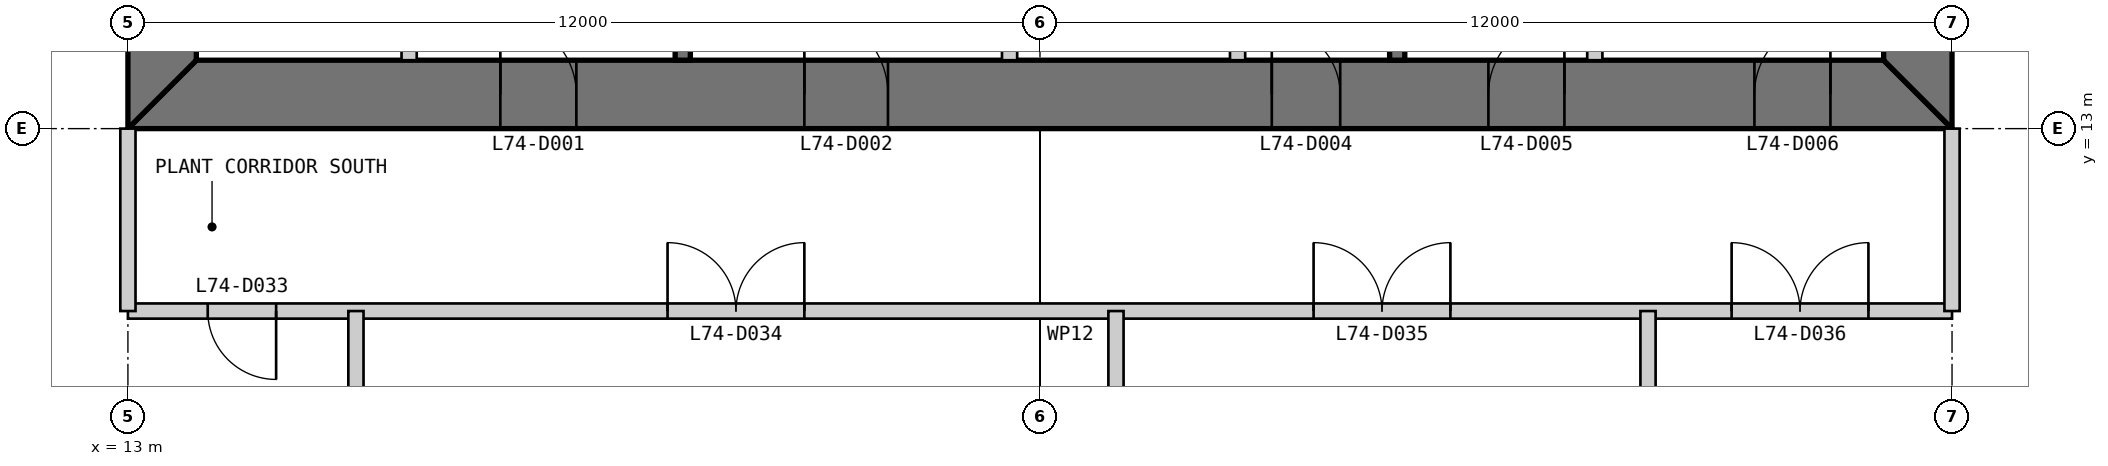
"""IFC4 building model, lengths in metres.
Left out: names, types, materials, properties, quantities, classifications, styles, units other than length and angle.
Written with IfcOpenShell. Run it as: python <this file> out.ifc"""

import sys

from ifc_helpers import new_model, si_unit, direction, frame, frame_2d, origin, place, context, subcontext, project, spatial, polyline, rectangle, outline, extrude, element, fill, save


model = new_model("IFC4")
c1 = context("Model", 3, precision=1e-05, world=origin(), true_north=direction((0.0, 1.0)))
c2 = subcontext(c1, "Body", "Model", "MODEL_VIEW")
j1 = project(units=[si_unit("LENGTHUNIT", "METRE"), si_unit("PLANEANGLEUNIT", "RADIAN")], contexts=[c1])
p1 = place(None, origin())
s1 = spatial("IfcSite", under=j1, at=p1, CompositionType="ELEMENT")
p2 = place(p1, origin())
s2 = spatial("IfcBuilding", under=s1, at=p2, CompositionType="ELEMENT")
p3 = place(p2, frame((0.0, 0.0, 307.8)))
s3 = spatial("IfcBuildingStorey", under=s2, at=p3, CompositionType="ELEMENT", Elevation=307.8)
p4 = place(p3, frame((13.0, 13.45, 0.0), z_axis=(0.0, 0.0, 1.0), x_axis=(1.0, 0.0, 0.0)))
e1 = element("IfcWall", 1, at=p4, inside=s3, PredefinedType="SHEAR", context=c2, shape_type="SweptSolid", body=[
    extrude(outline(polyline([(0.0, -0.45), (24.0, -0.45), (23.1, 0.45), (0.9, 0.45), (0.0, -0.45)])), origin(), (0.0, 0.0, 1.0), 5.75),
])
p5 = place(p4, frame((4.9, 0.0, 0.0)))
e2 = element("IfcOpeningElement", 2, at=p5, cuts=e1, PredefinedType="OPENING", context=c2, shape_type="SweptSolid", body=[
    extrude(rectangle(XDim=1.0, YDim=2.2, at=frame_2d((0.5, 1.1))), frame((0.0, 0.46, 0.0), z_axis=(0.0, -1.0, 0.0), x_axis=(1.0, 0.0, 0.0)), (0.0, 0.0, 1.0), 0.92),
])
p6 = place(p4, frame((8.9, 0.0, 0.0)))
e3 = element("IfcOpeningElement", 3, at=p6, cuts=e1, PredefinedType="OPENING", context=c2, shape_type="SweptSolid", body=[
    extrude(rectangle(XDim=1.1, YDim=2.2, at=frame_2d((0.55, 1.1))), frame((0.0, 0.46, 0.0), z_axis=(0.0, -1.0, 0.0), x_axis=(1.0, 0.0, 0.0)), (0.0, 0.0, 1.0), 0.92),
])
p7 = place(p4, frame((15.05, 0.0, 0.0)))
e4 = element("IfcOpeningElement", 4, at=p7, cuts=e1, PredefinedType="OPENING", context=c2, shape_type="SweptSolid", body=[
    extrude(rectangle(XDim=0.9, YDim=2.2, at=frame_2d((0.45, 1.1))), frame((0.0, 0.46, 0.0), z_axis=(0.0, -1.0, 0.0), x_axis=(1.0, 0.0, 0.0)), (0.0, 0.0, 1.0), 0.92),
])
p8 = place(p4, frame((17.9, 0.0, 0.0)))
e5 = element("IfcOpeningElement", 5, at=p8, cuts=e1, PredefinedType="OPENING", context=c2, shape_type="SweptSolid", body=[
    extrude(rectangle(XDim=1.0, YDim=2.2, at=frame_2d((0.5, 1.1))), frame((0.0, 0.46, 0.0), z_axis=(0.0, -1.0, 0.0), x_axis=(1.0, 0.0, 0.0)), (0.0, 0.0, 1.0), 0.92),
])
p9 = place(p4, frame((21.4, 0.0, 0.0)))
e6 = element("IfcOpeningElement", 6, at=p9, cuts=e1, PredefinedType="OPENING", context=c2, shape_type="SweptSolid", body=[
    extrude(rectangle(XDim=1.0, YDim=2.2, at=frame_2d((0.5, 1.1))), frame((0.0, 0.46, 0.0), z_axis=(0.0, -1.0, 0.0), x_axis=(1.0, 0.0, 0.0)), (0.0, 0.0, 1.0), 0.92),
])
p10 = place(p3, frame((36.55, 13.9, 0.0), z_axis=(0.0, 0.0, 1.0), x_axis=(0.0, 1.0, 0.0)))
e7 = element("IfcWall", 7, at=p10, inside=s3, PredefinedType="SHEAR", context=c2, shape_type="SweptSolid", body=[
    extrude(outline(polyline([(-0.9, -0.45), (23.1, -0.45), (22.2, 0.45), (0.0, 0.45), (-0.9, -0.45)])), origin(), (0.0, 0.0, 1.0), 5.75),
])
p11 = place(p10, frame((20.2, 0.0, 0.0)))
e8 = element("IfcOpeningElement", 8, at=p11, cuts=e7, PredefinedType="OPENING", context=c2, shape_type="SweptSolid", body=[
    extrude(rectangle(XDim=1.0, YDim=2.2, at=frame_2d((0.5, 1.1))), frame((0.0, 0.46, 0.0), z_axis=(0.0, -1.0, 0.0), x_axis=(1.0, 0.0, 0.0)), (0.0, 0.0, 1.0), 0.92),
])
p12 = place(p10, frame((17.25, 0.0, 0.0)))
e9 = element("IfcOpeningElement", 9, at=p12, cuts=e7, PredefinedType="OPENING", context=c2, shape_type="SweptSolid", body=[
    extrude(rectangle(XDim=0.9, YDim=2.2, at=frame_2d((0.45, 1.1))), frame((0.0, 0.46, 0.0), z_axis=(0.0, -1.0, 0.0), x_axis=(1.0, 0.0, 0.0)), (0.0, 0.0, 1.0), 0.92),
])
p13 = place(p3, frame((13.45, 36.1, 0.0), z_axis=(0.0, 0.0, 1.0), x_axis=(0.0, -1.0, 0.0)))
e10 = element("IfcWall", 10, at=p13, inside=s3, PredefinedType="SHEAR", context=c2, shape_type="SweptSolid", body=[
    extrude(outline(polyline([(-0.9, -0.45), (23.1, -0.45), (22.2, 0.45), (0.0, 0.45), (-0.9, -0.45)])), origin(), (0.0, 0.0, 1.0), 5.75),
])
p14 = place(p13, frame((20.2, 0.0, 0.0)))
e11 = element("IfcOpeningElement", 11, at=p14, cuts=e10, PredefinedType="OPENING", context=c2, shape_type="SweptSolid", body=[
    extrude(rectangle(XDim=1.0, YDim=2.2, at=frame_2d((0.5, 1.1))), frame((0.0, 0.46, 0.0), z_axis=(0.0, -1.0, 0.0), x_axis=(1.0, 0.0, 0.0)), (0.0, 0.0, 1.0), 0.92),
])
p15 = place(p13, frame((17.25, 0.0, 0.0)))
e12 = element("IfcOpeningElement", 12, at=p15, cuts=e10, PredefinedType="OPENING", context=c2, shape_type="SweptSolid", body=[
    extrude(rectangle(XDim=0.9, YDim=2.2, at=frame_2d((0.45, 1.1))), frame((0.0, 0.46, 0.0), z_axis=(0.0, -1.0, 0.0), x_axis=(1.0, 0.0, 0.0)), (0.0, 0.0, 1.0), 0.92),
])
p16 = place(p3, frame((16.7, 13.9, 0.0), z_axis=(0.0, 0.0, 1.0), x_axis=(0.0, 1.0, 0.0)))
e13 = element("IfcWall", 13, at=p16, inside=s3, PredefinedType="PARTITIONING", context=c2, shape_type="SweptSolid", body=[
    extrude(rectangle(XDim=16.1, YDim=0.2, at=frame_2d((8.05, 0.0))), origin(), (0.0, 0.0, 1.0), 5.75),
])
p17 = place(p16, frame((7.4, 0.0, 0.0)))
e14 = element("IfcOpeningElement", 14, at=p17, cuts=e13, PredefinedType="OPENING", context=c2, shape_type="SweptSolid", body=[
    extrude(rectangle(XDim=0.9, YDim=2.2, at=frame_2d((0.45, 1.1))), frame((0.0, 0.11, 0.0), z_axis=(0.0, -1.0, 0.0), x_axis=(1.0, 0.0, 0.0)), (0.0, 0.0, 1.0), 0.22),
])
p18 = place(p16, frame((12.4, 0.0, 0.0)))
e15 = element("IfcOpeningElement", 15, at=p18, cuts=e13, PredefinedType="OPENING", context=c2, shape_type="SweptSolid", body=[
    extrude(rectangle(XDim=0.9, YDim=2.2, at=frame_2d((0.45, 1.1))), frame((0.0, 0.11, 0.0), z_axis=(0.0, -1.0, 0.0), x_axis=(1.0, 0.0, 0.0)), (0.0, 0.0, 1.0), 0.22),
])
p19 = place(p3, frame((20.3, 13.9, 0.0), z_axis=(0.0, 0.0, 1.0), x_axis=(0.0, 1.0, 0.0)))
e16 = element("IfcWall", 16, at=p19, inside=s3, PredefinedType="SOLIDWALL", context=c2, shape_type="SweptSolid", body=[
    extrude(rectangle(XDim=16.1, YDim=0.2, at=frame_2d((8.05, 0.0))), origin(), (0.0, 0.0, 1.0), 5.75),
])
p20 = place(p19, frame((9.65, 0.0, 0.0)))
e17 = element("IfcOpeningElement", 17, at=p20, cuts=e16, PredefinedType="OPENING", context=c2, shape_type="SweptSolid", body=[
    extrude(rectangle(XDim=0.9, YDim=2.2, at=frame_2d((0.45, 1.1))), frame((0.0, 0.11, 0.0), z_axis=(0.0, -1.0, 0.0), x_axis=(1.0, 0.0, 0.0)), (0.0, 0.0, 1.0), 0.22),
])
p21 = place(p19, frame((14.65, 0.0, 0.0)))
e18 = element("IfcOpeningElement", 18, at=p21, cuts=e16, PredefinedType="OPENING", context=c2, shape_type="SweptSolid", body=[
    extrude(rectangle(XDim=0.9, YDim=2.2, at=frame_2d((0.45, 1.1))), frame((0.0, 0.11, 0.0), z_axis=(0.0, -1.0, 0.0), x_axis=(1.0, 0.0, 0.0)), (0.0, 0.0, 1.0), 0.22),
])
p22 = place(p3, frame((24.6, 13.9, 0.0), z_axis=(0.0, 0.0, 1.0), x_axis=(0.0, 1.0, 0.0)))
e19 = element("IfcWall", 19, at=p22, inside=s3, PredefinedType="PARTITIONING", context=c2, shape_type="SweptSolid", body=[
    extrude(rectangle(XDim=3.3, YDim=0.2, at=frame_2d((1.65, 0.0))), origin(), (0.0, 0.0, 1.0), 5.75),
])
p23 = place(p22, frame((0.9, 0.0, 0.0)))
e20 = element("IfcOpeningElement", 20, at=p23, cuts=e19, PredefinedType="OPENING", context=c2, shape_type="SweptSolid", body=[
    extrude(rectangle(XDim=1.1, YDim=2.2, at=frame_2d((0.55, 1.1))), frame((0.0, 0.11, 0.0), z_axis=(0.0, -1.0, 0.0), x_axis=(1.0, 0.0, 0.0)), (0.0, 0.0, 1.0), 0.22),
])
p24 = place(p3, frame((27.6, 13.9, 0.0), z_axis=(0.0, 0.0, 1.0), x_axis=(0.0, 1.0, 0.0)))
e21 = element("IfcWall", 21, at=p24, inside=s3, PredefinedType="PARTITIONING", context=c2, shape_type="SweptSolid", body=[
    extrude(rectangle(XDim=3.3, YDim=0.2, at=frame_2d((1.65, 0.0))), origin(), (0.0, 0.0, 1.0), 5.75),
])
p25 = place(p3, frame((29.7, 13.9, 0.0), z_axis=(0.0, 0.0, 1.0), x_axis=(0.0, 1.0, 0.0)))
e22 = element("IfcWall", 22, at=p25, inside=s3, PredefinedType="SOLIDWALL", context=c2, shape_type="SweptSolid", body=[
    extrude(rectangle(XDim=6.1, YDim=0.2, at=frame_2d((3.05, 0.0))), origin(), (0.0, 0.0, 1.0), 5.75),
])
p26 = place(p3, frame((32.3, 13.9, 0.0), z_axis=(0.0, 0.0, 1.0), x_axis=(0.0, 1.0, 0.0)))
e23 = element("IfcWall", 23, at=p26, inside=s3, PredefinedType="PARTITIONING", context=c2, shape_type="SweptSolid", body=[
    extrude(rectangle(XDim=6.1, YDim=0.2, at=frame_2d((3.05, 0.0))), origin(), (0.0, 0.0, 1.0), 5.75),
])
p27 = place(p3, frame((13.0, 10.6, 0.0), z_axis=(0.0, 0.0, 1.0), x_axis=(1.0, 0.0, 0.0)))
e24 = element("IfcWall", 24, at=p27, inside=s3, PredefinedType="PARTITIONING", context=c2, shape_type="SweptSolid", body=[
    extrude(rectangle(XDim=24.0, YDim=0.2, at=frame_2d((12.0, 0.0))), origin(), (0.0, 0.0, 1.0), 5.75),
])
p28 = place(p27, frame((1.05, 0.0, 0.0)))
e25 = element("IfcOpeningElement", 25, at=p28, cuts=e24, PredefinedType="OPENING", context=c2, shape_type="SweptSolid", body=[
    extrude(rectangle(XDim=0.9, YDim=2.2, at=frame_2d((0.45, 1.1))), frame((0.0, 0.11, 0.0), z_axis=(0.0, -1.0, 0.0), x_axis=(1.0, 0.0, 0.0)), (0.0, 0.0, 1.0), 0.22),
])
p29 = place(p27, frame((7.1, 0.0, 0.0)))
e26 = element("IfcOpeningElement", 26, at=p29, cuts=e24, PredefinedType="OPENING", context=c2, shape_type="SweptSolid", body=[
    extrude(rectangle(XDim=1.8, YDim=2.4, at=frame_2d((0.9, 1.2))), frame((0.0, 0.11, 0.0), z_axis=(0.0, -1.0, 0.0), x_axis=(1.0, 0.0, 0.0)), (0.0, 0.0, 1.0), 0.22),
])
p30 = place(p27, frame((15.6, 0.0, 0.0)))
e27 = element("IfcOpeningElement", 27, at=p30, cuts=e24, PredefinedType="OPENING", context=c2, shape_type="SweptSolid", body=[
    extrude(rectangle(XDim=1.8, YDim=2.4, at=frame_2d((0.9, 1.2))), frame((0.0, 0.11, 0.0), z_axis=(0.0, -1.0, 0.0), x_axis=(1.0, 0.0, 0.0)), (0.0, 0.0, 1.0), 0.22),
])
p31 = place(p27, frame((21.1, 0.0, 0.0)))
e28 = element("IfcOpeningElement", 28, at=p31, cuts=e24, PredefinedType="OPENING", context=c2, shape_type="SweptSolid", body=[
    extrude(rectangle(XDim=1.8, YDim=2.4, at=frame_2d((0.9, 1.2))), frame((0.0, 0.11, 0.0), z_axis=(0.0, -1.0, 0.0), x_axis=(1.0, 0.0, 0.0)), (0.0, 0.0, 1.0), 0.22),
])
for number, where, z_axis, x_axis in (
    (29, (13.0, 10.6, 0.0), (0.0, 0.0, 1.0), (0.0, 1.0, 0.0)),
    (30, (37.0, 10.6, 0.0), (0.0, 0.0, 1.0), (0.0, 1.0, 0.0)),
):
    element("IfcWall", number, at=place(p3, frame(where, z_axis=z_axis, x_axis=x_axis)), inside=s3, PredefinedType="PARTITIONING", context=c2, shape_type="SweptSolid", body=[
        extrude(rectangle(XDim=2.4, YDim=0.2, at=frame_2d((1.2, 0.0))), origin(), (0.0, 0.0, 1.0), 4.802),
    ])
p32 = place(p3, frame((16.0, 0.0, 0.0), z_axis=(0.0, 0.0, 1.0), x_axis=(0.0, 1.0, 0.0)))
e31 = element("IfcWall", 31, at=p32, inside=s3, PredefinedType="PARTITIONING", context=c2, shape_type="SweptSolid", body=[
    extrude(rectangle(XDim=10.6, YDim=0.2, at=frame_2d((5.3, 0.0))), origin(), (0.0, 0.0, 1.0), 4.904),
])
p33 = place(p32, frame((4.4, 0.0, 0.0)))
e32 = element("IfcOpeningElement", 32, at=p33, cuts=e31, PredefinedType="OPENING", context=c2, shape_type="SweptSolid", body=[
    extrude(rectangle(XDim=1.8, YDim=2.4, at=frame_2d((0.9, 1.2))), frame((0.0, 0.11, 0.0), z_axis=(0.0, -1.0, 0.0), x_axis=(1.0, 0.0, 0.0)), (0.0, 0.0, 1.0), 0.22),
])
p34 = place(p3, frame((26.0, 0.0, 0.0), z_axis=(0.0, 0.0, 1.0), x_axis=(0.0, 1.0, 0.0)))
e33 = element("IfcWall", 33, at=p34, inside=s3, PredefinedType="PARTITIONING", context=c2, shape_type="SweptSolid", body=[
    extrude(rectangle(XDim=10.6, YDim=0.2, at=frame_2d((5.3, 0.0))), origin(), (0.0, 0.0, 1.0), 5.75),
])
p35 = place(p34, frame((4.4, 0.0, 0.0)))
e34 = element("IfcOpeningElement", 34, at=p35, cuts=e33, PredefinedType="OPENING", context=c2, shape_type="SweptSolid", body=[
    extrude(rectangle(XDim=1.8, YDim=2.4, at=frame_2d((0.9, 1.2))), frame((0.0, 0.11, 0.0), z_axis=(0.0, -1.0, 0.0), x_axis=(1.0, 0.0, 0.0)), (0.0, 0.0, 1.0), 0.22),
])
p36 = place(p3, frame((33.0, 0.0, 0.0), z_axis=(0.0, 0.0, 1.0), x_axis=(0.0, 1.0, 0.0)))
e35 = element("IfcWall", 35, at=p36, inside=s3, PredefinedType="PARTITIONING", context=c2, shape_type="SweptSolid", body=[
    extrude(rectangle(XDim=10.6, YDim=0.2, at=frame_2d((5.3, 0.0))), origin(), (0.0, 0.0, 1.0), 5.75),
])
p37 = place(p36, frame((4.4, 0.0, 0.0)))
e36 = element("IfcOpeningElement", 36, at=p37, cuts=e35, PredefinedType="OPENING", context=c2, shape_type="SweptSolid", body=[
    extrude(rectangle(XDim=1.8, YDim=2.4, at=frame_2d((0.9, 1.2))), frame((0.0, 0.11, 0.0), z_axis=(0.0, -1.0, 0.0), x_axis=(1.0, 0.0, 0.0)), (0.0, 0.0, 1.0), 0.22),
])
p38 = place(p5, origin())
e37 = element("IfcDoor", 37, at=p38, inside=s3, OperationType="SINGLE_SWING_LEFT", PredefinedType="DOOR", context=c2, shape_type="SweptSolid", body=[
    extrude(rectangle(XDim=1.0, YDim=2.2, at=frame_2d((0.5, 1.1))), frame((0.0, 0.025, 0.0), z_axis=(0.0, -1.0, 0.0), x_axis=(1.0, 0.0, 0.0)), (0.0, 0.0, 1.0), 0.05),
    extrude(outline(polyline([(0.0, 0.0), (0.04, 0.0), (0.04, 2.16), (0.96, 2.16), (0.96, 0.0), (1.0, 0.0), (1.0, 2.2), (0.0, 2.2), (0.0, 0.0)])), frame((0.0, 0.3, 0.0), z_axis=(0.0, -1.0, 0.0), x_axis=(1.0, 0.0, 0.0)), (0.0, 0.0, 1.0), 0.6),
])
fill(e2, e37)
p39 = place(p6, origin())
e38 = element("IfcDoor", 38, at=p39, inside=s3, OperationType="SINGLE_SWING_LEFT", PredefinedType="DOOR", context=c2, shape_type="SweptSolid", body=[
    extrude(rectangle(XDim=1.1, YDim=2.2, at=frame_2d((0.55, 1.1))), frame((0.0, 0.025, 0.0), z_axis=(0.0, -1.0, 0.0), x_axis=(1.0, 0.0, 0.0)), (0.0, 0.0, 1.0), 0.05),
    extrude(outline(polyline([(0.0, 0.0), (0.04, 0.0), (0.04, 2.16), (1.06, 2.16), (1.06, 0.0), (1.1, 0.0), (1.1, 2.2), (0.0, 2.2), (0.0, 0.0)])), frame((0.0, 0.3, 0.0), z_axis=(0.0, -1.0, 0.0), x_axis=(1.0, 0.0, 0.0)), (0.0, 0.0, 1.0), 0.6),
])
fill(e3, e38)
p40 = place(p7, origin())
e39 = element("IfcDoor", 39, at=p40, inside=s3, OperationType="SINGLE_SWING_LEFT", PredefinedType="DOOR", context=c2, shape_type="SweptSolid", body=[
    extrude(rectangle(XDim=0.9, YDim=2.2, at=frame_2d((0.45, 1.1))), frame((0.0, 0.025, 0.0), z_axis=(0.0, -1.0, 0.0), x_axis=(1.0, 0.0, 0.0)), (0.0, 0.0, 1.0), 0.05),
    extrude(outline(polyline([(0.0, 0.0), (0.04, 0.0), (0.04, 2.16), (0.86, 2.16), (0.86, 0.0), (0.9, 0.0), (0.9, 2.2), (0.0, 2.2), (0.0, 0.0)])), frame((0.0, 0.3, 0.0), z_axis=(0.0, -1.0, 0.0), x_axis=(1.0, 0.0, 0.0)), (0.0, 0.0, 1.0), 0.6),
])
fill(e4, e39)
p41 = place(p8, origin())
e40 = element("IfcDoor", 40, at=p41, inside=s3, OperationType="SINGLE_SWING_RIGHT", PredefinedType="DOOR", context=c2, shape_type="SweptSolid", body=[
    extrude(rectangle(XDim=1.0, YDim=2.2, at=frame_2d((0.5, 1.1))), frame((0.0, 0.025, 0.0), z_axis=(0.0, -1.0, 0.0), x_axis=(1.0, 0.0, 0.0)), (0.0, 0.0, 1.0), 0.05),
    extrude(outline(polyline([(0.0, 0.0), (0.04, 0.0), (0.04, 2.16), (0.96, 2.16), (0.96, 0.0), (1.0, 0.0), (1.0, 2.2), (0.0, 2.2), (0.0, 0.0)])), frame((0.0, 0.3, 0.0), z_axis=(0.0, -1.0, 0.0), x_axis=(1.0, 0.0, 0.0)), (0.0, 0.0, 1.0), 0.6),
])
fill(e5, e40)
p42 = place(p9, origin())
e41 = element("IfcDoor", 41, at=p42, inside=s3, OperationType="SINGLE_SWING_RIGHT", PredefinedType="DOOR", context=c2, shape_type="SweptSolid", body=[
    extrude(rectangle(XDim=1.0, YDim=2.2, at=frame_2d((0.5, 1.1))), frame((0.0, 0.025, 0.0), z_axis=(0.0, -1.0, 0.0), x_axis=(1.0, 0.0, 0.0)), (0.0, 0.0, 1.0), 0.05),
    extrude(outline(polyline([(0.0, 0.0), (0.04, 0.0), (0.04, 2.16), (0.96, 2.16), (0.96, 0.0), (1.0, 0.0), (1.0, 2.2), (0.0, 2.2), (0.0, 0.0)])), frame((0.0, 0.3, 0.0), z_axis=(0.0, -1.0, 0.0), x_axis=(1.0, 0.0, 0.0)), (0.0, 0.0, 1.0), 0.6),
])
fill(e6, e41)
p43 = place(p28, frame((0.9, 0.0, 0.0), z_axis=(0.0, 0.0, 1.0), x_axis=(-1.0, 0.0, 0.0)))
e42 = element("IfcDoor", 42, at=p43, inside=s3, OperationType="SINGLE_SWING_LEFT", PredefinedType="DOOR", context=c2, shape_type="SweptSolid", body=[
    extrude(rectangle(XDim=0.9, YDim=2.2, at=frame_2d((0.45, 1.1))), frame((0.0, 0.025, 0.0), z_axis=(0.0, -1.0, 0.0), x_axis=(1.0, 0.0, 0.0)), (0.0, 0.0, 1.0), 0.05),
])
fill(e25, e42)
p44 = place(p29, origin())
e43 = element("IfcDoor", 43, at=p44, inside=s3, OperationType="DOUBLE_DOOR_SINGLE_SWING", PredefinedType="DOOR", context=c2, shape_type="SweptSolid", body=[
    extrude(rectangle(XDim=1.8, YDim=2.4, at=frame_2d((0.9, 1.2))), frame((0.0, 0.025, 0.0), z_axis=(0.0, -1.0, 0.0), x_axis=(1.0, 0.0, 0.0)), (0.0, 0.0, 1.0), 0.05),
])
fill(e26, e43)
p45 = place(p30, origin())
e44 = element("IfcDoor", 44, at=p45, inside=s3, OperationType="DOUBLE_DOOR_SINGLE_SWING", PredefinedType="DOOR", context=c2, shape_type="SweptSolid", body=[
    extrude(rectangle(XDim=1.8, YDim=2.4, at=frame_2d((0.9, 1.2))), frame((0.0, 0.025, 0.0), z_axis=(0.0, -1.0, 0.0), x_axis=(1.0, 0.0, 0.0)), (0.0, 0.0, 1.0), 0.05),
])
fill(e27, e44)
p46 = place(p31, origin())
e45 = element("IfcDoor", 45, at=p46, inside=s3, OperationType="DOUBLE_DOOR_SINGLE_SWING", PredefinedType="DOOR", context=c2, shape_type="SweptSolid", body=[
    extrude(rectangle(XDim=1.8, YDim=2.4, at=frame_2d((0.9, 1.2))), frame((0.0, 0.025, 0.0), z_axis=(0.0, -1.0, 0.0), x_axis=(1.0, 0.0, 0.0)), (0.0, 0.0, 1.0), 0.05),
])
fill(e28, e45)
save(model, sys.argv[1])
